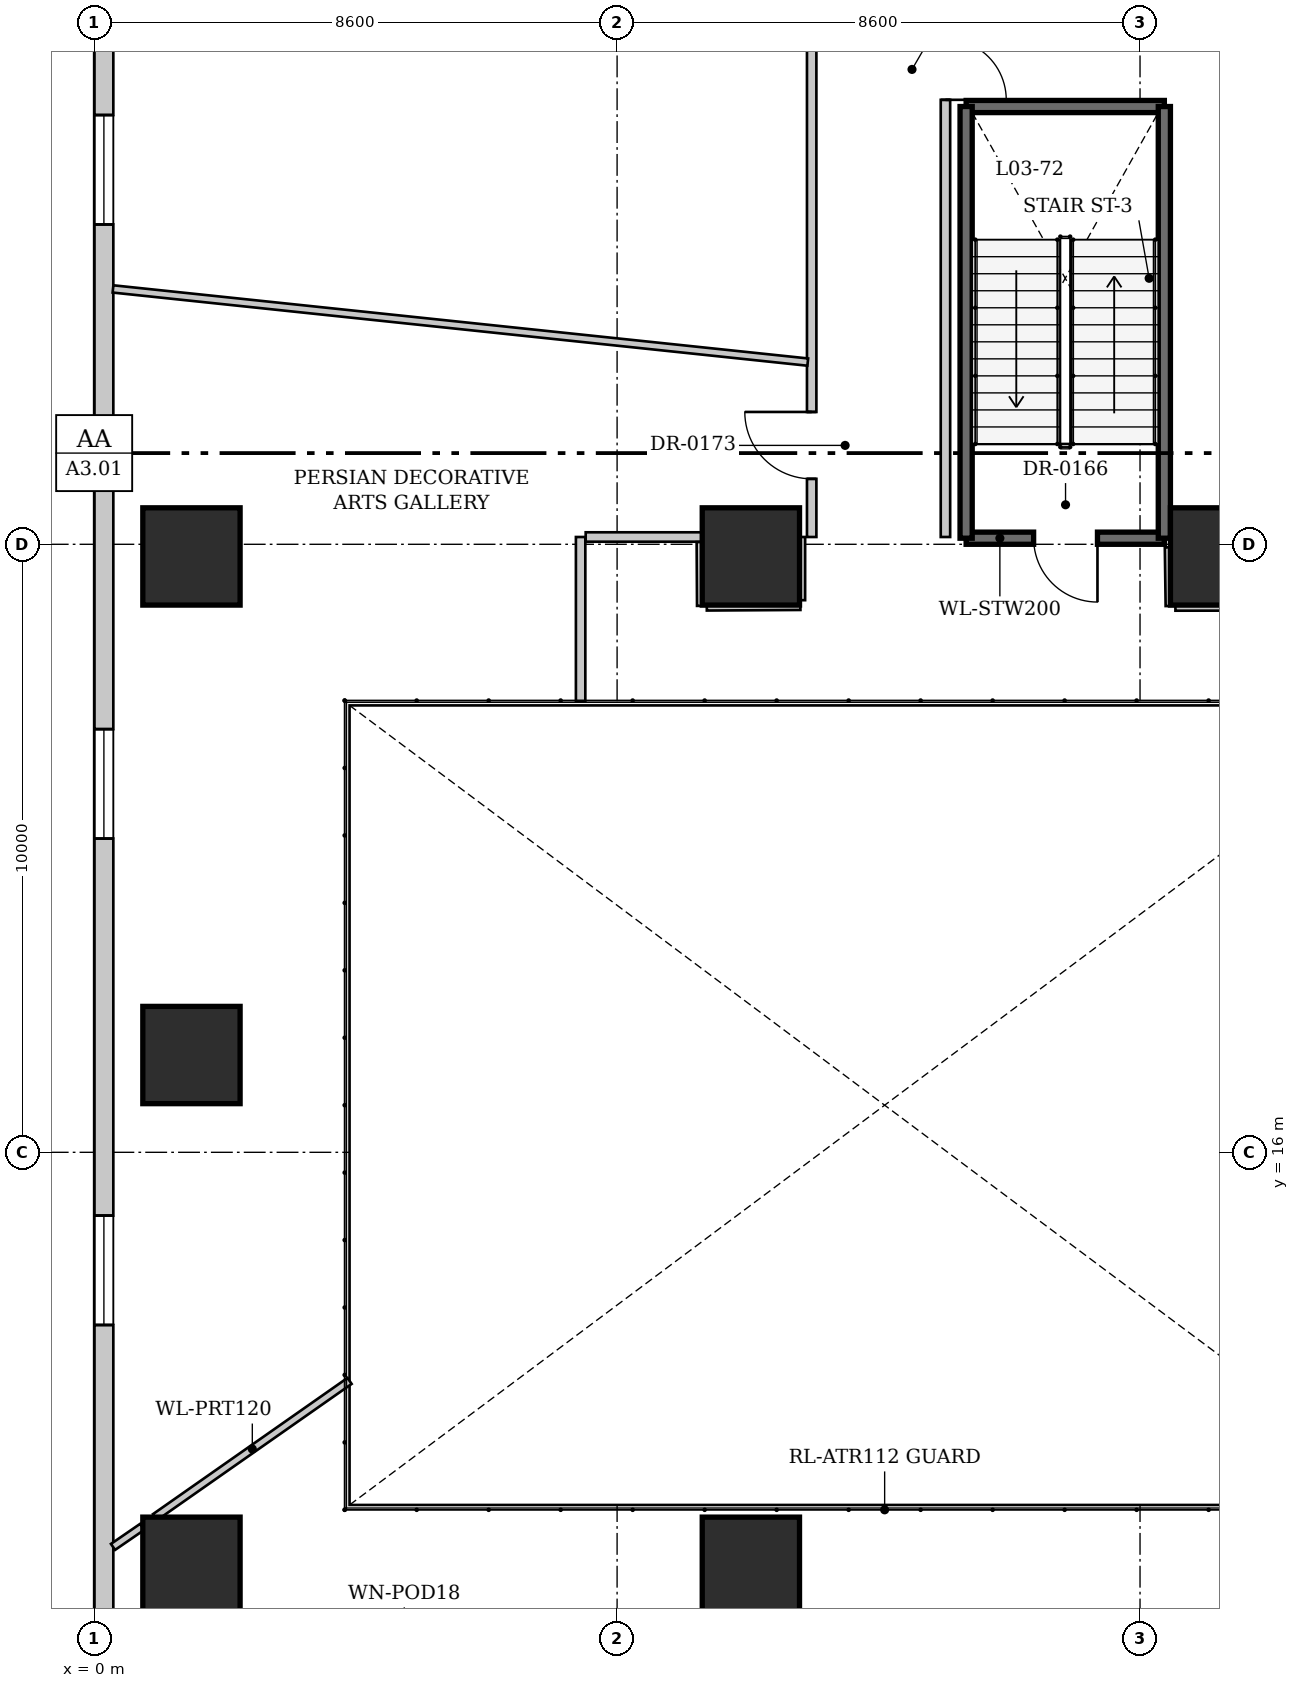
"""IFC4 building model, lengths in metres.
Left out: names, types, materials, properties, quantities, classifications, styles, units other than length and angle.
Written with IfcOpenShell. Run it as: python <this file> out.ifc"""

import sys

from ifc_helpers import new_model, si_unit, direction, frame, frame_2d, origin, origin_2d, place, context, subcontext, project, spatial, rectangle, extrude, source, transform, mapped, element, fill, save


model = new_model("IFC4")
c1 = context("Model", 3, precision=1e-05, world=origin(), true_north=direction((0.0, 1.0)))
c2 = subcontext(c1, "Body", "Model", "MODEL_VIEW")
j1 = project(units=[si_unit("LENGTHUNIT", "METRE"), si_unit("PLANEANGLEUNIT", "RADIAN")], contexts=[c1])
p1 = place(None, origin())
s1 = spatial("IfcSite", under=j1, at=p1, CompositionType="ELEMENT")
p2 = place(p1, origin())
s2 = spatial("IfcBuilding", under=s1, at=p2, CompositionType="ELEMENT")
p3 = place(p2, frame((0.0, 0.0, 14.4)))
s3 = spatial("IfcBuildingStorey", under=s2, at=p3, CompositionType="ELEMENT", Elevation=14.4)
for number, where, z_axis, x_axis in (
    (1, (1.6, 9.2, 0.0), (0.0, 0.0, 1.0), (1.0, 0.0, 0.0)),
    (2, (1.6, 17.6, 0.0), (0.0, 0.0, 1.0), (1.0, 0.0, 0.0)),
    (3, (1.6, 25.8, 0.0), (0.0, 0.0, 1.0), (1.0, 0.0, 0.0)),
    (4, (10.8, 9.2, 0.0), (0.0, 0.0, 1.0), (1.0, 0.0, 0.0)),
    (5, (10.8, 25.8, 0.0), (0.0, 0.0, 1.0), (1.0, 0.0, 0.0)),
    (6, (18.5, 25.8, 0.0), (0.0, 0.0, 1.0), (1.0, 0.0, 0.0)),
):
    element("IfcColumn", number, at=place(p3, frame(where, z_axis=z_axis, x_axis=x_axis)), inside=s3, PredefinedType="COLUMN", context=c2, shape_type="SweptSolid", body=[
        extrude(rectangle(XDim=1.6, YDim=1.6, at=origin_2d()), origin(), (0.0, 0.0, 1.0), 4.25),
    ])
p4 = place(p3, frame((0.16, 8.16, 0.0), z_axis=(0.0, 0.0, 1.0), x_axis=(0.0, 1.0, 0.0)))
e7 = element("IfcWall", 7, at=p4, inside=s3, PredefinedType="SOLIDWALL", context=c2, shape_type="SweptSolid", body=[
    extrude(rectangle(XDim=39.68, YDim=0.31, at=frame_2d((19.84, 0.0))), origin(), (0.0, 0.0, 1.0), 4.05),
])
p5 = place(p4, frame((5.0, 0.0, 0.95)))
e8 = element("IfcOpeningElement", 8, at=p5, cuts=e7, PredefinedType="OPENING", context=c2, shape_type="SweptSolid", body=[
    extrude(rectangle(XDim=1.8, YDim=2.4, at=frame_2d((0.9, 1.2))), frame((0.0, 0.165, 0.0), z_axis=(0.0, -1.0, 0.0), x_axis=(1.0, 0.0, 0.0)), (0.0, 0.0, 1.0), 0.33),
])
p6 = place(p4, frame((13.0, 0.0, 0.95)))
e9 = element("IfcOpeningElement", 9, at=p6, cuts=e7, PredefinedType="OPENING", context=c2, shape_type="SweptSolid", body=[
    extrude(rectangle(XDim=1.8, YDim=2.4, at=frame_2d((0.9, 1.2))), frame((0.0, 0.165, 0.0), z_axis=(0.0, -1.0, 0.0), x_axis=(1.0, 0.0, 0.0)), (0.0, 0.0, 1.0), 0.33),
])
p7 = place(p4, frame((23.1, 0.0, 0.95)))
e10 = element("IfcOpeningElement", 10, at=p7, cuts=e7, PredefinedType="OPENING", context=c2, shape_type="SweptSolid", body=[
    extrude(rectangle(XDim=1.8, YDim=2.4, at=frame_2d((0.9, 1.2))), frame((0.0, 0.165, 0.0), z_axis=(0.0, -1.0, 0.0), x_axis=(1.0, 0.0, 0.0)), (0.0, 0.0, 1.0), 0.33),
])
p8 = place(p4, frame((31.0, 0.0, 0.95)))
e11 = element("IfcOpeningElement", 11, at=p8, cuts=e7, PredefinedType="OPENING", context=c2, shape_type="SweptSolid", body=[
    extrude(rectangle(XDim=1.8, YDim=2.4, at=frame_2d((0.9, 1.2))), frame((0.0, 0.165, 0.0), z_axis=(0.0, -1.0, 0.0), x_axis=(1.0, 0.0, 0.0)), (0.0, 0.0, 1.0), 0.33),
])
p9 = place(p3, frame((17.6, 26.1, 0.0), z_axis=(0.0, 0.0, 1.0), x_axis=(-1.0, 0.0, 0.0)))
e12 = element("IfcWall", 12, at=p9, inside=s3, PredefinedType="SHEAR", context=c2, shape_type="SweptSolid", body=[
    extrude(rectangle(XDim=3.26, YDim=0.2, at=frame_2d((1.63, 0.0))), origin(), (0.0, 0.0, 1.0), 4.6),
])
p10 = place(p9, frame((1.1, 0.0, 0.0)))
e13 = element("IfcOpeningElement", 13, at=p10, cuts=e12, PredefinedType="OPENING", context=c2, shape_type="SweptSolid", body=[
    extrude(rectangle(XDim=1.05, YDim=2.15, at=frame_2d((0.525, 1.075))), frame((0.0, 0.11, 0.0), z_axis=(0.0, -1.0, 0.0), x_axis=(1.0, 0.0, 0.0)), (0.0, 0.0, 1.0), 0.22),
])
p11 = place(p3, frame((14.34, 33.2, 0.0), z_axis=(0.0, 0.0, 1.0), x_axis=(1.0, 0.0, 0.0)))
e14 = element("IfcWall", 14, at=p11, inside=s3, PredefinedType="SHEAR", context=c2, shape_type="SweptSolid", body=[
    extrude(rectangle(XDim=3.26, YDim=0.2, at=frame_2d((1.63, 0.0))), origin(), (0.0, 0.0, 1.0), 4.6),
])
for number, where, z_axis, x_axis in (
    (15, (14.34, 26.1, 0.0), (0.0, 0.0, 1.0), (0.0, 1.0, 0.0)),
    (16, (17.6, 26.1, 0.0), (0.0, 0.0, 1.0), (0.0, 1.0, 0.0)),
):
    element("IfcWall", number, at=place(p3, frame(where, z_axis=z_axis, x_axis=x_axis)), inside=s3, PredefinedType="SHEAR", context=c2, shape_type="SweptSolid", body=[
        extrude(rectangle(XDim=7.1, YDim=0.2, at=frame_2d((3.55, 0.0))), origin(), (0.0, 0.0, 1.0), 4.6),
    ])
p12 = place(p3, frame((11.8, 26.12, 0.0), z_axis=(0.0, 0.0, 1.0), x_axis=(0.0, 1.0, 0.0)))
e17 = element("IfcWall", 17, at=p12, inside=s3, PredefinedType="PARTITIONING", context=c2, shape_type="SweptSolid", body=[
    extrude(rectangle(XDim=12.88, YDim=0.155, at=frame_2d((6.44, 0.0))), origin(), (0.0, 0.0, 1.0), 4.25),
])
p13 = place(p12, frame((0.957, 0.0, 0.0)))
e18 = element("IfcOpeningElement", 18, at=p13, cuts=e17, PredefinedType="OPENING", context=c2, shape_type="SweptSolid", body=[
    extrude(rectangle(XDim=1.1, YDim=2.2, at=frame_2d((0.55, 1.1))), frame((0.0, 0.087, 0.0), z_axis=(0.0, -1.0, 0.0), x_axis=(1.0, 0.0, 0.0)), (0.0, 0.0, 1.0), 0.175),
])
p14 = place(p3, frame((14.0, 39.0, 0.0), z_axis=(0.0, 0.0, 1.0), x_axis=(0.0, -1.0, 0.0)))
e19 = element("IfcWall", 19, at=p14, inside=s3, PredefinedType="PARTITIONING", context=c2, shape_type="SweptSolid", body=[
    extrude(rectangle(XDim=12.88, YDim=0.155, at=frame_2d((6.44, 0.0))), origin(), (0.0, 0.0, 1.0), 4.25),
])
p15 = place(p14, frame((4.69, 0.0, 0.0)))
e20 = element("IfcOpeningElement", 20, at=p15, cuts=e19, PredefinedType="OPENING", context=c2, shape_type="SweptSolid", body=[
    extrude(rectangle(XDim=1.0, YDim=2.15, at=frame_2d((0.5, 1.075))), frame((0.0, 0.087, 0.0), z_axis=(0.0, -1.0, 0.0), x_axis=(1.0, 0.0, 0.0)), (0.0, 0.0, 1.0), 0.175),
])
p16 = place(p3, frame((8.0, 23.42, 0.0), z_axis=(0.0, 0.0, 1.0), x_axis=(0.0, 1.0, 0.0)))
e21 = element("IfcWall", 21, at=p16, inside=s3, PredefinedType="PARTITIONING", context=c2, shape_type="SweptSolid", body=[
    extrude(rectangle(XDim=2.7, YDim=0.155, at=frame_2d((1.35, 0.0))), origin(), (0.0, 0.0, 1.0), 4.25),
])
p17 = place(p3, frame((8.083, 26.12, 0.0), z_axis=(0.0, 0.0, 1.0), x_axis=(1.0, 0.0, 0.0)))
e22 = element("IfcWall", 22, at=p17, inside=s3, PredefinedType="PARTITIONING", context=c2, shape_type="SweptSolid", body=[
    extrude(rectangle(XDim=1.902, YDim=0.155, at=frame_2d((0.951, 0.0))), origin(), (0.0, 0.0, 1.0), 4.25),
])
p18 = place(p3, frame((9.986, 26.037, 0.0), z_axis=(0.0, 0.0, 1.0), x_axis=(0.005817914102, -0.999983075795, 0.0)))
e23 = element("IfcWall", 23, at=p18, inside=s3, PredefinedType="PARTITIONING", context=c2, shape_type="SweptSolid", body=[
    extrude(rectangle(XDim=1.049, YDim=0.155, at=frame_2d((0.524, 0.0))), origin(), (0.0, 0.0, 1.0), 4.25),
])
p19 = place(p3, frame((10.075, 24.988, 0.0), z_axis=(0.0, 0.0, 1.0), x_axis=(0.99998278709, 0.005867326851, 0.0)))
e24 = element("IfcWall", 24, at=p19, inside=s3, PredefinedType="PARTITIONING", context=c2, shape_type="SweptSolid", body=[
    extrude(rectangle(XDim=1.54, YDim=0.155, at=frame_2d((0.77, 0.0))), origin(), (0.0, 0.0, 1.0), 4.25),
])
p20 = place(p3, frame((11.615, 25.081, 0.0), z_axis=(0.0, 0.0, 1.0), x_axis=(0.000234852037, 0.999999972422, 0.0)))
e25 = element("IfcWall", 25, at=p20, inside=s3, PredefinedType="PARTITIONING", context=c2, shape_type="SweptSolid", body=[
    extrude(rectangle(XDim=1.04, YDim=0.155, at=frame_2d((0.52, 0.0))), origin(), (0.0, 0.0, 1.0), 4.25),
])
p21 = place(p3, frame((17.685, 25.95, 0.0), z_axis=(0.0, 0.0, 1.0), x_axis=(0.013915656501, -0.999903172564, 0.0)))
e26 = element("IfcWall", 26, at=p21, inside=s3, PredefinedType="PARTITIONING", context=c2, shape_type="SweptSolid", body=[
    extrude(rectangle(XDim=0.965, YDim=0.155, at=frame_2d((0.482, 0.0))), origin(), (0.0, 0.0, 1.0), 4.25),
])
p22 = place(p3, frame((17.782, 24.985, 0.0), z_axis=(0.0, 0.0, 1.0), x_axis=(0.999999372198, 0.001120537155, 0.0)))
e27 = element("IfcWall", 27, at=p22, inside=s3, PredefinedType="PARTITIONING", context=c2, shape_type="SweptSolid", body=[
    extrude(rectangle(XDim=1.525, YDim=0.155, at=frame_2d((0.763, 0.0))), origin(), (0.0, 0.0, 1.0), 4.25),
])
p23 = place(p3, frame((4.2, 12.24, 0.0), z_axis=(0.0, 0.0, 1.0), x_axis=(-0.819105597065, -0.573642764146, 0.0)))
e28 = element("IfcWall", 28, at=p23, inside=s3, PredefinedType="PARTITIONING", context=c2, shape_type="SweptSolid", body=[
    extrude(rectangle(XDim=3.905, YDim=0.12, at=frame_2d((1.952, 0.0))), origin(), (0.0, 0.0, 1.0), 4.25),
])
p24 = place(p3, frame((0.79, 9.84, 0.0), z_axis=(0.0, 0.0, 1.0), x_axis=(-0.823968545399, -0.566635540885, 0.0)))
e29 = element("IfcWall", 29, at=p24, inside=s3, PredefinedType="PARTITIONING", context=c2, shape_type="SweptSolid", body=[
    extrude(rectangle(XDim=0.583, YDim=0.12, at=frame_2d((0.291, 0.0))), origin(), (0.0, 0.0, 1.0), 4.25),
])
p25 = place(p3, frame((0.31, 30.2, 0.0), z_axis=(0.0, 0.0, 1.0), x_axis=(0.994501260159, -0.104724608104, 0.0)))
e30 = element("IfcWall", 30, at=p25, inside=s3, PredefinedType="PARTITIONING", context=c2, shape_type="SweptSolid", body=[
    extrude(rectangle(XDim=11.489, YDim=0.12, at=frame_2d((5.744, 0.0))), origin(), (0.0, 0.0, 1.0), 3.812),
])
m1 = source(origin(), c2, "Body", "SweptSolid", [
    extrude(rectangle(XDim=1.8, YDim=2.4, at=frame_2d((0.9, 1.2))), frame((0.0, 0.03, 0.0), z_axis=(0.0, -1.0, 0.0), x_axis=(1.0, 0.0, 0.0)), (0.0, 0.0, 1.0), 0.06),
])
p26 = place(p5, origin())
e31 = element("IfcWindow", 31, at=p26, inside=s3, PartitioningType="SINGLE_PANEL", PredefinedType="WINDOW", context=c2, shape_type="MappedRepresentation", body=[
    mapped(m1, transform((0.0, 0.0, 0.0), x_axis=(1.0, 0.0, 0.0), y_axis=(0.0, 1.0, 0.0), z_axis=(0.0, 0.0, 1.0), scale=1.0)),
])
fill(e8, e31)
p27 = place(p6, origin())
e32 = element("IfcWindow", 32, at=p27, inside=s3, PartitioningType="SINGLE_PANEL", PredefinedType="WINDOW", context=c2, shape_type="MappedRepresentation", body=[
    mapped(m1, transform((0.0, 0.0, 0.0), x_axis=(1.0, 0.0, 0.0), y_axis=(0.0, 1.0, 0.0), z_axis=(0.0, 0.0, 1.0), scale=1.0)),
])
fill(e9, e32)
p28 = place(p7, origin())
e33 = element("IfcWindow", 33, at=p28, inside=s3, PartitioningType="SINGLE_PANEL", PredefinedType="WINDOW", context=c2, shape_type="MappedRepresentation", body=[
    mapped(m1, transform((0.0, 0.0, 0.0), x_axis=(1.0, 0.0, 0.0), y_axis=(0.0, 1.0, 0.0), z_axis=(0.0, 0.0, 1.0), scale=1.0)),
])
fill(e10, e33)
m2 = source(origin(), c2, "Body", "SweptSolid", [
    extrude(rectangle(XDim=1.05, YDim=2.15, at=frame_2d((0.525, 1.075))), frame((0.0, 0.025, 0.0), z_axis=(0.0, -1.0, 0.0), x_axis=(1.0, 0.0, 0.0)), (0.0, 0.0, 1.0), 0.05),
])
p29 = place(p10, origin())
e34 = element("IfcDoor", 34, at=p29, inside=s3, OperationType="SINGLE_SWING_LEFT", PredefinedType="DOOR", context=c2, shape_type="MappedRepresentation", body=[
    mapped(m2, transform((0.0, 0.0, 0.0), x_axis=(1.0, 0.0, 0.0), y_axis=(0.0, 1.0, 0.0), z_axis=(0.0, 0.0, 1.0), scale=1.0)),
])
fill(e13, e34)
m3 = source(origin(), c2, "Body", "SweptSolid", [
    extrude(rectangle(XDim=1.1, YDim=2.2, at=frame_2d((0.55, 1.1))), frame((0.0, 0.025, 0.0), z_axis=(0.0, -1.0, 0.0), x_axis=(1.0, 0.0, 0.0)), (0.0, 0.0, 1.0), 0.05),
])
p30 = place(p13, origin())
e35 = element("IfcDoor", 35, at=p30, inside=s3, OperationType="SINGLE_SWING_RIGHT", PredefinedType="DOOR", context=c2, shape_type="MappedRepresentation", body=[
    mapped(m3, transform((0.0, 0.0, 0.0), x_axis=(1.0, 0.0, 0.0), y_axis=(0.0, 1.0, 0.0), z_axis=(0.0, 0.0, 1.0), scale=1.0)),
])
fill(e18, e35)
m4 = source(origin(), c2, "Body", "SweptSolid", [
    extrude(rectangle(XDim=1.0, YDim=2.15, at=frame_2d((0.5, 1.075))), frame((0.0, 0.025, 0.0), z_axis=(0.0, -1.0, 0.0), x_axis=(1.0, 0.0, 0.0)), (0.0, 0.0, 1.0), 0.05),
])
p31 = place(p15, origin())
e36 = element("IfcDoor", 36, at=p31, inside=s3, OperationType="SINGLE_SWING_RIGHT", PredefinedType="DOOR", context=c2, shape_type="MappedRepresentation", body=[
    mapped(m4, transform((0.0, 0.0, 0.0), x_axis=(1.0, 0.0, 0.0), y_axis=(0.0, 1.0, 0.0), z_axis=(0.0, 0.0, 1.0), scale=1.0)),
])
fill(e20, e36)
save(model, sys.argv[1])
